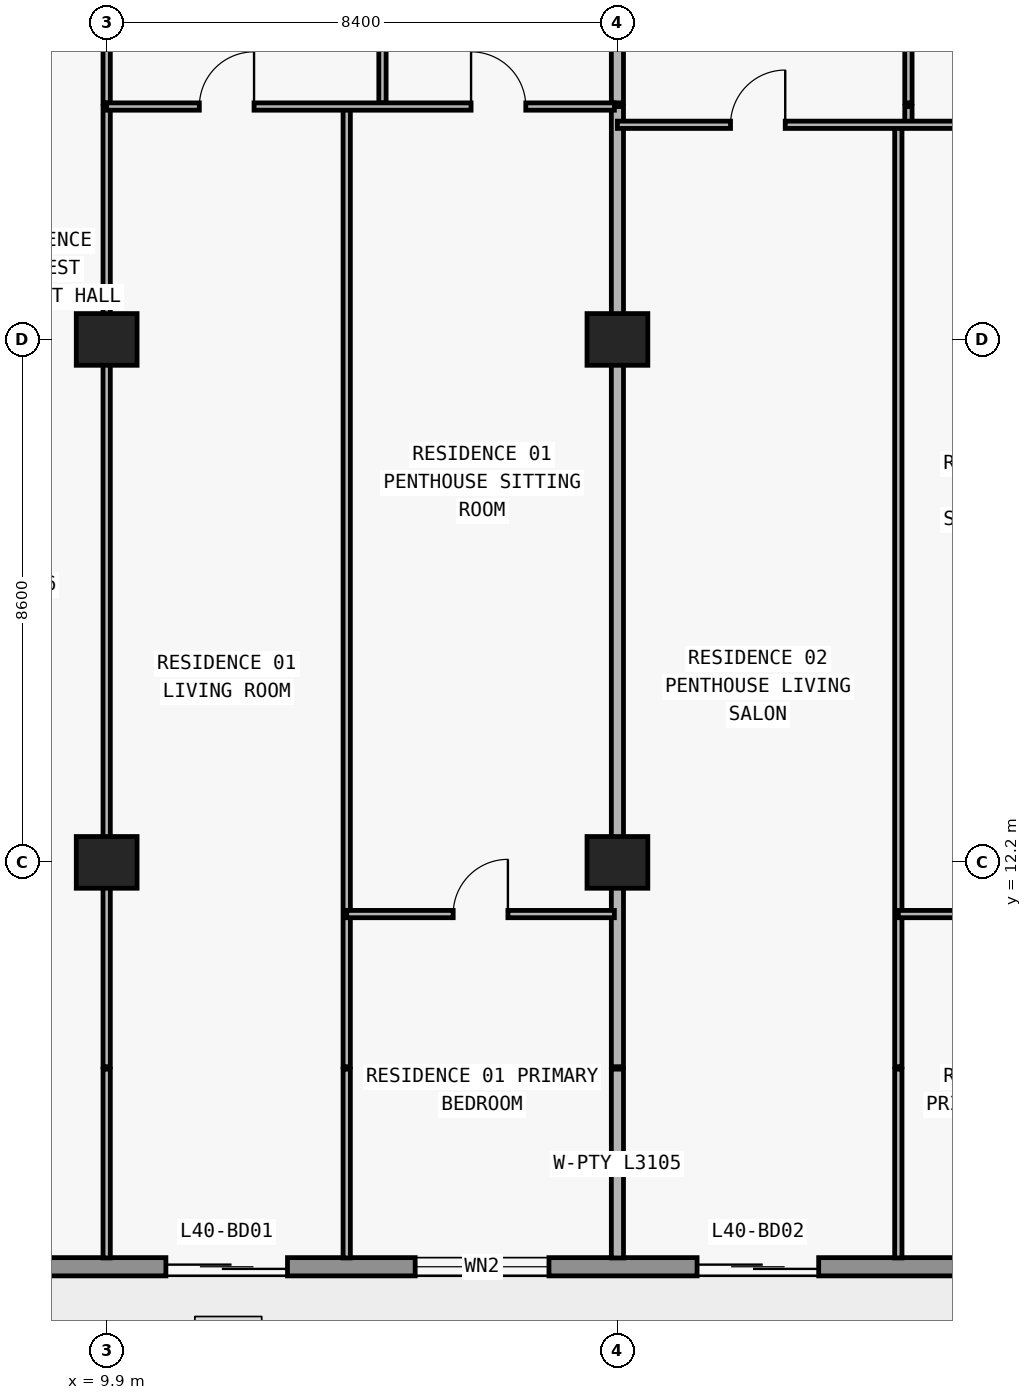
"""IFC4 building model, lengths in metres.
Left out: names, types, materials, properties, quantities, classifications, styles, units other than length and angle.
Written with IfcOpenShell. Run it as: python <this file> out.ifc"""

import sys

from ifc_helpers import new_model, si_unit, direction, frame, frame_2d, origin, origin_2d, place, context, subcontext, project, spatial, rectangle, extrude, element, fill, save


model = new_model("IFC4")
c1 = context("Model", 3, precision=1e-05, world=origin(), true_north=direction((0.0, 1.0)))
c2 = subcontext(c1, "Body", "Model", "MODEL_VIEW")
j1 = project(units=[si_unit("LENGTHUNIT", "METRE"), si_unit("PLANEANGLEUNIT", "RADIAN")], contexts=[c1])
p1 = place(None, origin())
s1 = spatial("IfcSite", under=j1, at=p1, CompositionType="ELEMENT")
p2 = place(p1, origin())
s2 = spatial("IfcBuilding", under=s1, at=p2, CompositionType="ELEMENT")
p3 = place(p2, frame((0.0, 0.0, 145.5)))
s3 = spatial("IfcBuildingStorey", under=s2, at=p3, CompositionType="ELEMENT", Elevation=145.5)
for number, where, z_axis, x_axis in (
    (1, (9.9, 12.2, 0.0), (0.0, 0.0, 1.0), (1.0, 0.0, 0.0)),
    (2, (18.3, 12.2, 0.0), (0.0, 0.0, 1.0), (1.0, 0.0, 0.0)),
    (3, (9.9, 20.8, 0.0), (0.0, 0.0, 1.0), (1.0, 0.0, 0.0)),
    (4, (18.3, 20.8, 0.0), (0.0, 0.0, 1.0), (1.0, 0.0, 0.0)),
):
    element("IfcColumn", number, at=place(p3, frame(where, z_axis=z_axis, x_axis=x_axis)), inside=s3, PredefinedType="COLUMN", context=c2, shape_type="SweptSolid", body=[
        extrude(rectangle(XDim=1.0, YDim=0.85, at=origin_2d()), origin(), (0.0, 0.0, 1.0), 3.05),
    ])
p4 = place(p3, frame((70.1, 5.55, 0.0), z_axis=(0.0, 0.0, 1.0), x_axis=(-1.0, 0.0, 0.0)))
e5 = element("IfcWall", 5, at=p4, inside=s3, PredefinedType="STANDARD", context=c2, shape_type="SweptSolid", body=[
    extrude(rectangle(XDim=62.4, YDim=0.3, at=frame_2d((31.2, 0.0))), origin(), (0.0, 0.0, 1.0), 3.05),
])
p5 = place(p4, frame((57.226, 0.0, 0.0)))
e6 = element("IfcOpeningElement", 6, at=p5, cuts=e5, PredefinedType="OPENING", context=c2, shape_type="SweptSolid", body=[
    extrude(rectangle(XDim=2.0, YDim=2.3, at=frame_2d((1.0, 1.15))), frame((0.0, 0.16, 0.0), z_axis=(0.0, -1.0, 0.0), x_axis=(1.0, 0.0, 0.0)), (0.0, 0.0, 1.0), 0.32),
])
p6 = place(p4, frame((52.926, 0.0, 0.85)))
e7 = element("IfcOpeningElement", 7, at=p6, cuts=e5, PredefinedType="OPENING", context=c2, shape_type="SweptSolid", body=[
    extrude(rectangle(XDim=2.2, YDim=1.55, at=frame_2d((1.1, 0.775))), frame((0.0, 0.16, 0.0), z_axis=(0.0, -1.0, 0.0), x_axis=(1.0, 0.0, 0.0)), (0.0, 0.0, 1.0), 0.32),
])
p7 = place(p4, frame((48.49, 0.0, 0.0)))
e8 = element("IfcOpeningElement", 8, at=p7, cuts=e5, PredefinedType="OPENING", context=c2, shape_type="SweptSolid", body=[
    extrude(rectangle(XDim=2.0, YDim=2.3, at=frame_2d((1.0, 1.15))), frame((0.0, 0.16, 0.0), z_axis=(0.0, -1.0, 0.0), x_axis=(1.0, 0.0, 0.0)), (0.0, 0.0, 1.0), 0.32),
])
p8 = place(p4, frame((44.39, 0.0, 0.85)))
e9 = element("IfcOpeningElement", 9, at=p8, cuts=e5, PredefinedType="OPENING", context=c2, shape_type="SweptSolid", body=[
    extrude(rectangle(XDim=1.8, YDim=1.55, at=frame_2d((0.9, 0.775))), frame((0.0, 0.16, 0.0), z_axis=(0.0, -1.0, 0.0), x_axis=(1.0, 0.0, 0.0)), (0.0, 0.0, 1.0), 0.32),
])
p9 = place(p4, frame((40.426, 0.0, 0.0)))
e10 = element("IfcOpeningElement", 10, at=p9, cuts=e5, PredefinedType="OPENING", context=c2, shape_type="SweptSolid", body=[
    extrude(rectangle(XDim=2.0, YDim=2.3, at=frame_2d((1.0, 1.15))), frame((0.0, 0.16, 0.0), z_axis=(0.0, -1.0, 0.0), x_axis=(1.0, 0.0, 0.0)), (0.0, 0.0, 1.0), 0.32),
])
p10 = place(p4, frame((36.126, 0.0, 0.85)))
e11 = element("IfcOpeningElement", 11, at=p10, cuts=e5, PredefinedType="OPENING", context=c2, shape_type="SweptSolid", body=[
    extrude(rectangle(XDim=2.2, YDim=1.55, at=frame_2d((1.1, 0.775))), frame((0.0, 0.16, 0.0), z_axis=(0.0, -1.0, 0.0), x_axis=(1.0, 0.0, 0.0)), (0.0, 0.0, 1.0), 0.32),
])
p11 = place(p4, frame((32.09, 0.0, 0.0)))
e12 = element("IfcOpeningElement", 12, at=p11, cuts=e5, PredefinedType="OPENING", context=c2, shape_type="SweptSolid", body=[
    extrude(rectangle(XDim=2.0, YDim=2.3, at=frame_2d((1.0, 1.15))), frame((0.0, 0.16, 0.0), z_axis=(0.0, -1.0, 0.0), x_axis=(1.0, 0.0, 0.0)), (0.0, 0.0, 1.0), 0.32),
])
p12 = place(p4, frame((28.21, 0.0, 0.65)))
e13 = element("IfcOpeningElement", 13, at=p12, cuts=e5, PredefinedType="OPENING", context=c2, shape_type="SweptSolid", body=[
    extrude(rectangle(XDim=2.6, YDim=1.85, at=frame_2d((1.3, 0.925))), frame((0.0, 0.16, 0.0), z_axis=(0.0, -1.0, 0.0), x_axis=(1.0, 0.0, 0.0)), (0.0, 0.0, 1.0), 0.32),
])
p13 = place(p4, frame((22.1, 0.0, 0.85)))
e14 = element("IfcOpeningElement", 14, at=p13, cuts=e5, PredefinedType="OPENING", context=c2, shape_type="SweptSolid", body=[
    extrude(rectangle(XDim=2.2, YDim=1.55, at=frame_2d((1.1, 0.775))), frame((0.0, 0.16, 0.0), z_axis=(0.0, -1.0, 0.0), x_axis=(1.0, 0.0, 0.0)), (0.0, 0.0, 1.0), 0.32),
])
p14 = place(p4, frame((16.09, 0.0, 0.0)))
e15 = element("IfcOpeningElement", 15, at=p14, cuts=e5, PredefinedType="OPENING", context=c2, shape_type="SweptSolid", body=[
    extrude(rectangle(XDim=2.0, YDim=2.3, at=frame_2d((1.0, 1.15))), frame((0.0, 0.16, 0.0), z_axis=(0.0, -1.0, 0.0), x_axis=(1.0, 0.0, 0.0)), (0.0, 0.0, 1.0), 0.32),
])
p15 = place(p4, frame((11.41, 0.0, 0.65)))
e16 = element("IfcOpeningElement", 16, at=p15, cuts=e5, PredefinedType="OPENING", context=c2, shape_type="SweptSolid", body=[
    extrude(rectangle(XDim=2.6, YDim=1.85, at=frame_2d((1.3, 0.925))), frame((0.0, 0.16, 0.0), z_axis=(0.0, -1.0, 0.0), x_axis=(1.0, 0.0, 0.0)), (0.0, 0.0, 1.0), 0.32),
])
p16 = place(p4, frame((5.3, 0.0, 0.85)))
e17 = element("IfcOpeningElement", 17, at=p16, cuts=e5, PredefinedType="OPENING", context=c2, shape_type="SweptSolid", body=[
    extrude(rectangle(XDim=2.2, YDim=1.55, at=frame_2d((1.1, 0.775))), frame((0.0, 0.16, 0.0), z_axis=(0.0, -1.0, 0.0), x_axis=(1.0, 0.0, 0.0)), (0.0, 0.0, 1.0), 0.32),
])
p17 = place(p3, frame((9.9, 5.695, 0.0), z_axis=(0.0, 0.0, 1.0), x_axis=(0.0, 1.0, 0.0)))
e18 = element("IfcWall", 18, at=p17, inside=s3, PredefinedType="PARTITIONING", context=c2, shape_type="SweptSolid", body=[
    extrude(rectangle(XDim=3.105, YDim=0.12, at=frame_2d((1.552, 0.0))), origin(), (0.0, 0.0, 1.0), 3.05),
])
p18 = place(p3, frame((9.9, 8.84, 0.0), z_axis=(0.0, 0.0, 1.0), x_axis=(0.0, 1.0, 0.0)))
e19 = element("IfcWall", 19, at=p18, inside=s3, PredefinedType="PARTITIONING", context=c2, shape_type="SweptSolid", body=[
    extrude(rectangle(XDim=15.79, YDim=0.12, at=frame_2d((7.895, 0.0))), origin(), (0.0, 0.0, 1.0), 2.174),
])
p19 = place(p3, frame((9.9, 24.69, 0.0), z_axis=(0.0, 0.0, 1.0), x_axis=(0.0, 1.0, 0.0)))
e20 = element("IfcWall", 20, at=p19, inside=s3, PredefinedType="PARTITIONING", context=c2, shape_type="SweptSolid", body=[
    extrude(rectangle(XDim=5.09, YDim=0.12, at=frame_2d((2.545, 0.0))), origin(), (0.0, 0.0, 1.0), 2.174),
])
p20 = place(p19, frame((2.095, 0.0, 0.0)))
e21 = element("IfcOpeningElement", 21, at=p20, cuts=e20, PredefinedType="OPENING", context=c2, shape_type="SweptSolid", body=[
    extrude(rectangle(XDim=0.9, YDim=2.124, at=frame_2d((0.45, 1.062))), frame((0.0, 0.07, 0.0), z_axis=(0.0, -1.0, 0.0), x_axis=(1.0, 0.0, 0.0)), (0.0, 0.0, 1.0), 0.14),
])
p21 = place(p3, frame((13.848, 5.695, 0.0), z_axis=(0.0, 0.0, 1.0), x_axis=(0.0, 1.0, 0.0)))
e22 = element("IfcWall", 22, at=p21, inside=s3, PredefinedType="PARTITIONING", context=c2, shape_type="SweptSolid", body=[
    extrude(rectangle(XDim=3.105, YDim=0.12, at=frame_2d((1.552, 0.0))), origin(), (0.0, 0.0, 1.0), 3.05),
])
p22 = place(p3, frame((13.848, 8.84, 0.0), z_axis=(0.0, 0.0, 1.0), x_axis=(0.0, 1.0, 0.0)))
e23 = element("IfcWall", 23, at=p22, inside=s3, PredefinedType="PARTITIONING", context=c2, shape_type="SweptSolid", body=[
    extrude(rectangle(XDim=15.79, YDim=0.12, at=frame_2d((7.895, 0.0))), origin(), (0.0, 0.0, 1.0), 3.05),
])
p23 = place(p3, frame((14.436, 24.69, 0.0), z_axis=(0.0, 0.0, 1.0), x_axis=(0.0, 1.0, 0.0)))
e24 = element("IfcWall", 24, at=p23, inside=s3, PredefinedType="PARTITIONING", context=c2, shape_type="SweptSolid", body=[
    extrude(rectangle(XDim=5.09, YDim=0.12, at=frame_2d((2.545, 0.0))), origin(), (0.0, 0.0, 1.0), 3.05),
])
p24 = place(p23, frame((2.095, 0.0, 0.0)))
e25 = element("IfcOpeningElement", 25, at=p24, cuts=e24, PredefinedType="OPENING", context=c2, shape_type="SweptSolid", body=[
    extrude(rectangle(XDim=0.9, YDim=2.15, at=frame_2d((0.45, 1.075))), frame((0.0, 0.07, 0.0), z_axis=(0.0, -1.0, 0.0), x_axis=(1.0, 0.0, 0.0)), (0.0, 0.0, 1.0), 0.14),
])
p25 = place(p3, frame((18.3, 5.695, 0.0), z_axis=(0.0, 0.0, 1.0), x_axis=(0.0, 1.0, 0.0)))
e26 = element("IfcWall", 26, at=p25, inside=s3, PredefinedType="PARTITIONING", context=c2, shape_type="SweptSolid", body=[
    extrude(rectangle(XDim=3.105, YDim=0.2, at=frame_2d((1.552, 0.0))), origin(), (0.0, 0.0, 1.0), 3.05),
])
p26 = place(p3, frame((18.3, 8.84, 0.0), z_axis=(0.0, 0.0, 1.0), x_axis=(0.0, 1.0, 0.0)))
e27 = element("IfcWall", 27, at=p26, inside=s3, PredefinedType="PARTITIONING", context=c2, shape_type="SweptSolid", body=[
    extrude(rectangle(XDim=15.79, YDim=0.2, at=frame_2d((7.895, 0.0))), origin(), (0.0, 0.0, 1.0), 2.174),
])
p27 = place(p3, frame((18.3, 24.69, 0.0), z_axis=(0.0, 0.0, 1.0), x_axis=(0.0, 1.0, 0.0)))
e28 = element("IfcWall", 28, at=p27, inside=s3, PredefinedType="PARTITIONING", context=c2, shape_type="SweptSolid", body=[
    extrude(rectangle(XDim=5.09, YDim=0.2, at=frame_2d((2.545, 0.0))), origin(), (0.0, 0.0, 1.0), 2.174),
])
p28 = place(p3, frame((22.92, 5.695, 0.0), z_axis=(0.0, 0.0, 1.0), x_axis=(0.0, 1.0, 0.0)))
e29 = element("IfcWall", 29, at=p28, inside=s3, PredefinedType="PARTITIONING", context=c2, shape_type="SweptSolid", body=[
    extrude(rectangle(XDim=3.105, YDim=0.12, at=frame_2d((1.552, 0.0))), origin(), (0.0, 0.0, 1.0), 3.05),
])
p29 = place(p3, frame((22.92, 8.84, 0.0), z_axis=(0.0, 0.0, 1.0), x_axis=(0.0, 1.0, 0.0)))
e30 = element("IfcWall", 30, at=p29, inside=s3, PredefinedType="PARTITIONING", context=c2, shape_type="SweptSolid", body=[
    extrude(rectangle(XDim=15.49, YDim=0.12, at=frame_2d((7.745, 0.0))), origin(), (0.0, 0.0, 1.0), 3.05),
])
p30 = place(p3, frame((23.086, 24.335, 0.0), z_axis=(0.0, 0.0, 1.0), x_axis=(0.0, 1.0, 0.0)))
e31 = element("IfcWall", 31, at=p30, inside=s3, PredefinedType="PARTITIONING", context=c2, shape_type="SweptSolid", body=[
    extrude(rectangle(XDim=0.295, YDim=0.12, at=frame_2d((0.147, 0.0))), origin(), (0.0, 0.0, 1.0), 3.05),
])
p31 = place(p3, frame((23.086, 24.69, 0.0), z_axis=(0.0, 0.0, 1.0), x_axis=(0.0, 1.0, 0.0)))
e32 = element("IfcWall", 32, at=p31, inside=s3, PredefinedType="PARTITIONING", context=c2, shape_type="SweptSolid", body=[
    extrude(rectangle(XDim=4.79, YDim=0.12, at=frame_2d((2.395, 0.0))), origin(), (0.0, 0.0, 1.0), 3.05),
])
p32 = place(p31, frame((1.945, 0.0, 0.0)))
e33 = element("IfcOpeningElement", 33, at=p32, cuts=e32, PredefinedType="OPENING", context=c2, shape_type="SweptSolid", body=[
    extrude(rectangle(XDim=0.9, YDim=2.15, at=frame_2d((0.45, 1.075))), frame((0.0, 0.07, 0.0), z_axis=(0.0, -1.0, 0.0), x_axis=(1.0, 0.0, 0.0)), (0.0, 0.0, 1.0), 0.14),
])
p33 = place(p3, frame((13.848, 11.35, 0.0), z_axis=(0.0, 0.0, 1.0), x_axis=(1.0, 0.0, 0.0)))
e34 = element("IfcWall", 34, at=p33, inside=s3, PredefinedType="PARTITIONING", context=c2, shape_type="SweptSolid", body=[
    extrude(rectangle(XDim=4.402, YDim=0.12, at=frame_2d((2.201, 0.0))), origin(), (0.0, 0.0, 1.0), 3.05),
])
p34 = place(p33, frame((1.751, 0.0, 0.0)))
e35 = element("IfcOpeningElement", 35, at=p34, cuts=e34, PredefinedType="OPENING", context=c2, shape_type="SweptSolid", body=[
    extrude(rectangle(XDim=0.9, YDim=2.15, at=frame_2d((0.45, 1.075))), frame((0.0, 0.07, 0.0), z_axis=(0.0, -1.0, 0.0), x_axis=(1.0, 0.0, 0.0)), (0.0, 0.0, 1.0), 0.14),
])
p35 = place(p3, frame((22.92, 11.35, 0.0), z_axis=(0.0, 0.0, 1.0), x_axis=(1.0, 0.0, 0.0)))
e36 = element("IfcWall", 36, at=p35, inside=s3, PredefinedType="PARTITIONING", context=c2, shape_type="SweptSolid", body=[
    extrude(rectangle(XDim=3.73, YDim=0.12, at=frame_2d((1.865, 0.0))), origin(), (0.0, 0.0, 1.0), 3.05),
])
p36 = place(p35, frame((1.415, 0.0, 0.0)))
e37 = element("IfcOpeningElement", 37, at=p36, cuts=e36, PredefinedType="OPENING", context=c2, shape_type="SweptSolid", body=[
    extrude(rectangle(XDim=0.9, YDim=2.15, at=frame_2d((0.45, 1.075))), frame((0.0, 0.07, 0.0), z_axis=(0.0, -1.0, 0.0), x_axis=(1.0, 0.0, 0.0)), (0.0, 0.0, 1.0), 0.14),
])
p37 = place(p3, frame((18.3, 24.33, 0.0), z_axis=(0.0, 0.0, 1.0), x_axis=(1.0, 0.0, 0.0)))
e38 = element("IfcWall", 38, at=p37, inside=s3, PredefinedType="PARTITIONING", context=c2, shape_type="SweptSolid", body=[
    extrude(rectangle(XDim=8.18, YDim=0.12, at=frame_2d((4.09, 0.0))), origin(), (0.0, 0.0, 1.0), 3.05),
])
p38 = place(p37, frame((1.86, 0.0, 0.0)))
e39 = element("IfcOpeningElement", 39, at=p38, cuts=e38, PredefinedType="OPENING", context=c2, shape_type="SweptSolid", body=[
    extrude(rectangle(XDim=0.9, YDim=2.15, at=frame_2d((0.45, 1.075))), frame((0.0, 0.07, 0.0), z_axis=(0.0, -1.0, 0.0), x_axis=(1.0, 0.0, 0.0)), (0.0, 0.0, 1.0), 0.14),
])
p39 = place(p37, frame((6.033, 0.0, 0.0)))
e40 = element("IfcOpeningElement", 40, at=p39, cuts=e38, PredefinedType="OPENING", context=c2, shape_type="SweptSolid", body=[
    extrude(rectangle(XDim=0.9, YDim=2.15, at=frame_2d((0.45, 1.075))), frame((0.0, 0.07, 0.0), z_axis=(0.0, -1.0, 0.0), x_axis=(1.0, 0.0, 0.0)), (0.0, 0.0, 1.0), 0.14),
])
p40 = place(p3, frame((9.9, 24.63, 0.0), z_axis=(0.0, 0.0, 1.0), x_axis=(1.0, 0.0, 0.0)))
e41 = element("IfcWall", 41, at=p40, inside=s3, PredefinedType="PARTITIONING", context=c2, shape_type="SweptSolid", body=[
    extrude(rectangle(XDim=8.35, YDim=0.12, at=frame_2d((4.175, 0.0))), origin(), (0.0, 0.0, 1.0), 3.05),
])
p41 = place(p40, frame((1.524, 0.0, 0.0)))
e42 = element("IfcOpeningElement", 42, at=p41, cuts=e41, PredefinedType="OPENING", context=c2, shape_type="SweptSolid", body=[
    extrude(rectangle(XDim=0.9, YDim=2.15, at=frame_2d((0.45, 1.075))), frame((0.0, 0.07, 0.0), z_axis=(0.0, -1.0, 0.0), x_axis=(1.0, 0.0, 0.0)), (0.0, 0.0, 1.0), 0.14),
])
p42 = place(p40, frame((5.993, 0.0, 0.0)))
e43 = element("IfcOpeningElement", 43, at=p42, cuts=e41, PredefinedType="OPENING", context=c2, shape_type="SweptSolid", body=[
    extrude(rectangle(XDim=0.9, YDim=2.15, at=frame_2d((0.45, 1.075))), frame((0.0, 0.07, 0.0), z_axis=(0.0, -1.0, 0.0), x_axis=(1.0, 0.0, 0.0)), (0.0, 0.0, 1.0), 0.14),
])
p43 = place(p5, origin())
e44 = element("IfcDoor", 44, at=p43, inside=s3, OperationType="DOUBLE_DOOR_SLIDING", PredefinedType="DOOR", context=c2, shape_type="SweptSolid", body=[
    extrude(rectangle(XDim=2.0, YDim=2.3, at=frame_2d((1.0, 1.15))), frame((0.0, 0.025, 0.0), z_axis=(0.0, -1.0, 0.0), x_axis=(1.0, 0.0, 0.0)), (0.0, 0.0, 1.0), 0.05),
])
fill(e6, e44)
p44 = place(p6, origin())
e45 = element("IfcWindow", 45, at=p44, inside=s3, PartitioningType="SINGLE_PANEL", PredefinedType="WINDOW", context=c2, shape_type="SweptSolid", body=[
    extrude(rectangle(XDim=2.2, YDim=1.55, at=frame_2d((1.1, 0.775))), frame((0.0, 0.03, 0.0), z_axis=(0.0, -1.0, 0.0), x_axis=(1.0, 0.0, 0.0)), (0.0, 0.0, 1.0), 0.06),
])
fill(e7, e45)
p45 = place(p7, origin())
e46 = element("IfcDoor", 46, at=p45, inside=s3, OperationType="DOUBLE_DOOR_SLIDING", PredefinedType="DOOR", context=c2, shape_type="SweptSolid", body=[
    extrude(rectangle(XDim=2.0, YDim=2.3, at=frame_2d((1.0, 1.15))), frame((0.0, 0.025, 0.0), z_axis=(0.0, -1.0, 0.0), x_axis=(1.0, 0.0, 0.0)), (0.0, 0.0, 1.0), 0.05),
])
fill(e8, e46)
p46 = place(p41, origin())
e47 = element("IfcDoor", 47, at=p46, inside=s3, OperationType="SINGLE_SWING_RIGHT", PredefinedType="DOOR", context=c2, shape_type="SweptSolid", body=[
    extrude(rectangle(XDim=0.9, YDim=2.15, at=frame_2d((0.45, 1.075))), frame((0.0, 0.025, 0.0), z_axis=(0.0, -1.0, 0.0), x_axis=(1.0, 0.0, 0.0)), (0.0, 0.0, 1.0), 0.05),
])
fill(e42, e47)
p47 = place(p42, origin())
e48 = element("IfcDoor", 48, at=p47, inside=s3, OperationType="SINGLE_SWING_LEFT", PredefinedType="DOOR", context=c2, shape_type="SweptSolid", body=[
    extrude(rectangle(XDim=0.9, YDim=2.15, at=frame_2d((0.45, 1.075))), frame((0.0, 0.025, 0.0), z_axis=(0.0, -1.0, 0.0), x_axis=(1.0, 0.0, 0.0)), (0.0, 0.0, 1.0), 0.05),
])
fill(e43, e48)
p48 = place(p34, origin())
e49 = element("IfcDoor", 49, at=p48, inside=s3, OperationType="SINGLE_SWING_RIGHT", PredefinedType="DOOR", context=c2, shape_type="SweptSolid", body=[
    extrude(rectangle(XDim=0.9, YDim=2.15, at=frame_2d((0.45, 1.075))), frame((0.0, 0.025, 0.0), z_axis=(0.0, -1.0, 0.0), x_axis=(1.0, 0.0, 0.0)), (0.0, 0.0, 1.0), 0.05),
])
fill(e35, e49)
p49 = place(p38, origin())
e50 = element("IfcDoor", 50, at=p49, inside=s3, OperationType="SINGLE_SWING_RIGHT", PredefinedType="DOOR", context=c2, shape_type="SweptSolid", body=[
    extrude(rectangle(XDim=0.9, YDim=2.15, at=frame_2d((0.45, 1.075))), frame((0.0, 0.025, 0.0), z_axis=(0.0, -1.0, 0.0), x_axis=(1.0, 0.0, 0.0)), (0.0, 0.0, 1.0), 0.05),
])
fill(e39, e50)
save(model, sys.argv[1])
